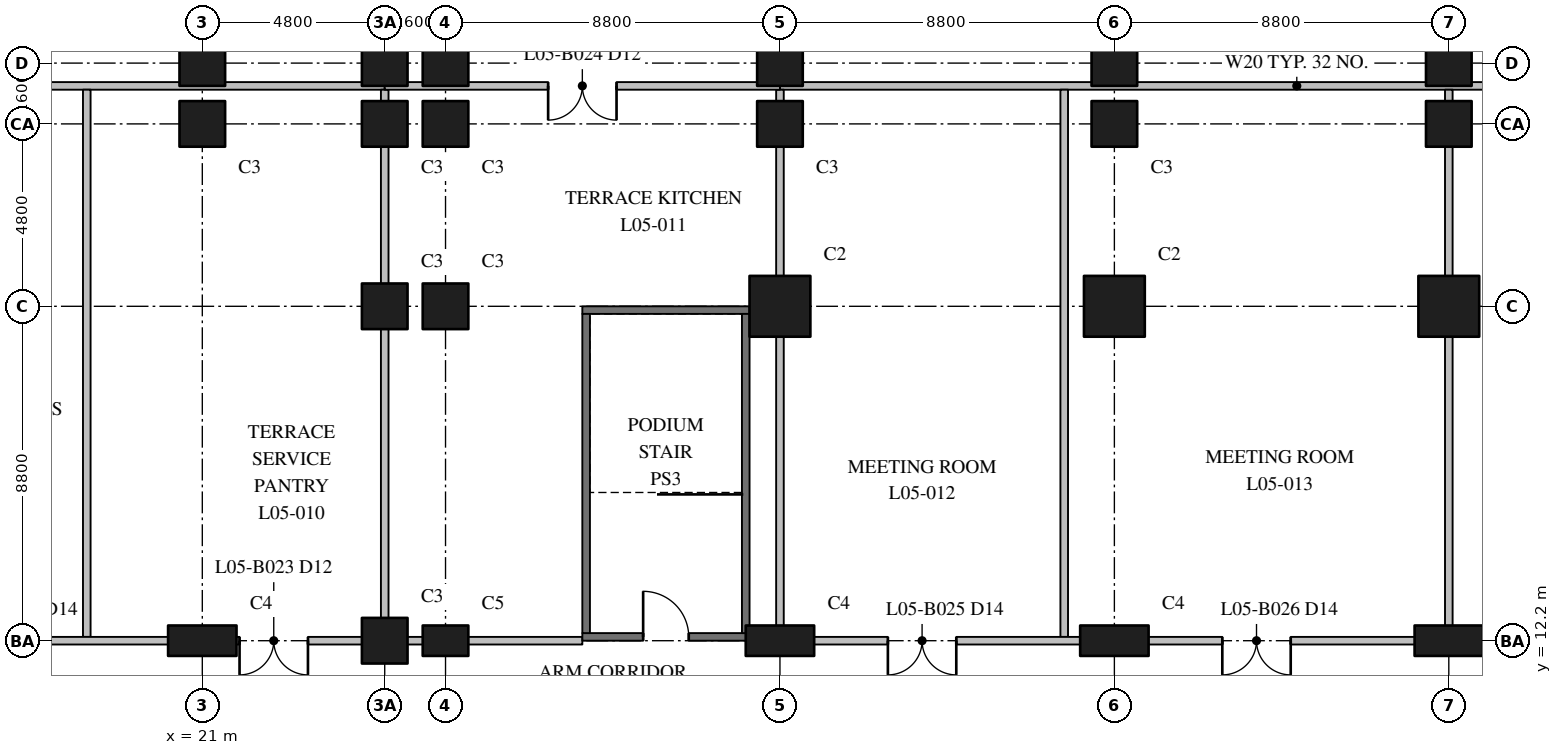
"""IFC4 building model, lengths in metres.
Left out: names, types, materials, properties, quantities, classifications, styles, units other than length and angle.
Written with IfcOpenShell. Run it as: python <this file> out.ifc"""

import sys

from ifc_helpers import new_model, si_unit, direction, frame, frame_2d, origin, origin_2d, place, context, subcontext, project, spatial, rectangle, extrude, element, fill, save


model = new_model("IFC4")
c1 = context("Model", 3, precision=1e-05, world=origin(), true_north=direction((0.0, 1.0)))
c2 = subcontext(c1, "Body", "Model", "MODEL_VIEW")
j1 = project(units=[si_unit("LENGTHUNIT", "METRE"), si_unit("PLANEANGLEUNIT", "RADIAN")], contexts=[c1])
p1 = place(None, origin())
s1 = spatial("IfcSite", under=j1, at=p1, CompositionType="ELEMENT")
p2 = place(p1, origin())
s2 = spatial("IfcBuilding", under=s1, at=p2, CompositionType="ELEMENT")
p3 = place(p2, frame((0.0, 0.0, 29.0)))
s3 = spatial("IfcBuildingStorey", under=s2, at=p3, CompositionType="ELEMENT", Elevation=29.0)
p4 = place(p3, frame((21.0, 12.2, 0.0), z_axis=(0.0, 0.0, 1.0), x_axis=(1.0, 0.0, 0.0)))
e1 = element("IfcColumn", 1, at=p4, inside=s3, PredefinedType="COLUMN", context=c2, shape_type="SweptSolid", body=[
    extrude(rectangle(XDim=1.8, YDim=0.8, at=origin_2d()), origin(), (0.0, 0.0, 1.0), 5.0),
])
for number, where, z_axis, x_axis in (
    (2, (21.0, 25.8, 0.0), (0.0, 0.0, 1.0), (1.0, 0.0, 0.0)),
    (3, (21.0, 27.4, 0.0), (0.0, 0.0, 1.0), (1.0, 0.0, 0.0)),
    (4, (25.8, 12.2, 0.0), (0.0, 0.0, 1.0), (1.0, 0.0, 0.0)),
    (5, (25.8, 21.0, 0.0), (0.0, 0.0, 1.0), (1.0, 0.0, 0.0)),
    (6, (25.8, 25.8, 0.0), (0.0, 0.0, 1.0), (1.0, 0.0, 0.0)),
    (7, (25.8, 27.4, 0.0), (0.0, 0.0, 1.0), (1.0, 0.0, 0.0)),
):
    element("IfcColumn", number, at=place(p3, frame(where, z_axis=z_axis, x_axis=x_axis)), inside=s3, PredefinedType="COLUMN", context=c2, shape_type="SweptSolid", body=[
        extrude(rectangle(XDim=1.2, YDim=1.2, at=origin_2d()), origin(), (0.0, 0.0, 1.0), 5.0),
    ])
p5 = place(p3, frame((27.4, 12.2, 0.0), z_axis=(0.0, 0.0, 1.0), x_axis=(1.0, 0.0, 0.0)))
e8 = element("IfcColumn", 8, at=p5, inside=s3, PredefinedType="COLUMN", context=c2, shape_type="SweptSolid", body=[
    extrude(rectangle(XDim=1.2, YDim=0.8, at=origin_2d()), origin(), (0.0, 0.0, 1.0), 5.0),
])
for number, where, z_axis, x_axis in (
    (9, (27.4, 21.0, 0.0), (0.0, 0.0, 1.0), (1.0, 0.0, 0.0)),
    (10, (27.4, 25.8, 0.0), (0.0, 0.0, 1.0), (1.0, 0.0, 0.0)),
):
    element("IfcColumn", number, at=place(p3, frame(where, z_axis=z_axis, x_axis=x_axis)), inside=s3, PredefinedType="COLUMN", context=c2, shape_type="SweptSolid", body=[
        extrude(rectangle(XDim=1.2, YDim=1.2, at=origin_2d()), origin(), (0.0, 0.0, 1.0), 5.0),
    ])
p6 = place(p3, frame((36.2, 12.2, 0.0), z_axis=(0.0, 0.0, 1.0), x_axis=(1.0, 0.0, 0.0)))
e11 = element("IfcColumn", 11, at=p6, inside=s3, PredefinedType="COLUMN", context=c2, shape_type="SweptSolid", body=[
    extrude(rectangle(XDim=1.8, YDim=0.8, at=origin_2d()), origin(), (0.0, 0.0, 1.0), 5.0),
])
p7 = place(p3, frame((36.2, 21.0, 0.0), z_axis=(0.0, 0.0, 1.0), x_axis=(1.0, 0.0, 0.0)))
e12 = element("IfcColumn", 12, at=p7, inside=s3, PredefinedType="COLUMN", context=c2, shape_type="SweptSolid", body=[
    extrude(rectangle(XDim=1.6, YDim=1.6, at=origin_2d()), origin(), (0.0, 0.0, 1.0), 5.0),
])
p8 = place(p3, frame((36.2, 25.8, 0.0), z_axis=(0.0, 0.0, 1.0), x_axis=(1.0, 0.0, 0.0)))
e13 = element("IfcColumn", 13, at=p8, inside=s3, PredefinedType="COLUMN", context=c2, shape_type="SweptSolid", body=[
    extrude(rectangle(XDim=1.2, YDim=1.2, at=origin_2d()), origin(), (0.0, 0.0, 1.0), 5.0),
])
p9 = place(p3, frame((45.0, 12.2, 0.0), z_axis=(0.0, 0.0, 1.0), x_axis=(1.0, 0.0, 0.0)))
e14 = element("IfcColumn", 14, at=p9, inside=s3, PredefinedType="COLUMN", context=c2, shape_type="SweptSolid", body=[
    extrude(rectangle(XDim=1.8, YDim=0.8, at=origin_2d()), origin(), (0.0, 0.0, 1.0), 5.0),
])
p10 = place(p3, frame((45.0, 21.0, 0.0), z_axis=(0.0, 0.0, 1.0), x_axis=(1.0, 0.0, 0.0)))
e15 = element("IfcColumn", 15, at=p10, inside=s3, PredefinedType="COLUMN", context=c2, shape_type="SweptSolid", body=[
    extrude(rectangle(XDim=1.6, YDim=1.6, at=origin_2d()), origin(), (0.0, 0.0, 1.0), 5.0),
])
p11 = place(p3, frame((45.0, 25.8, 0.0), z_axis=(0.0, 0.0, 1.0), x_axis=(1.0, 0.0, 0.0)))
e16 = element("IfcColumn", 16, at=p11, inside=s3, PredefinedType="COLUMN", context=c2, shape_type="SweptSolid", body=[
    extrude(rectangle(XDim=1.2, YDim=1.2, at=origin_2d()), origin(), (0.0, 0.0, 1.0), 5.0),
])
p12 = place(p3, frame((53.8, 12.2, 0.0), z_axis=(0.0, 0.0, 1.0), x_axis=(1.0, 0.0, 0.0)))
e17 = element("IfcColumn", 17, at=p12, inside=s3, PredefinedType="COLUMN", context=c2, shape_type="SweptSolid", body=[
    extrude(rectangle(XDim=1.8, YDim=0.8, at=origin_2d()), origin(), (0.0, 0.0, 1.0), 5.0),
])
p13 = place(p3, frame((53.8, 21.0, 0.0), z_axis=(0.0, 0.0, 1.0), x_axis=(1.0, 0.0, 0.0)))
e18 = element("IfcColumn", 18, at=p13, inside=s3, PredefinedType="COLUMN", context=c2, shape_type="SweptSolid", body=[
    extrude(rectangle(XDim=1.6, YDim=1.6, at=origin_2d()), origin(), (0.0, 0.0, 1.0), 5.0),
])
for number, where, z_axis, x_axis in (
    (19, (53.8, 25.8, 0.0), (0.0, 0.0, 1.0), (1.0, 0.0, 0.0)),
    (20, (27.4, 27.4, 0.0), (0.0, 0.0, 1.0), (1.0, 0.0, 0.0)),
    (21, (36.2, 27.4, 0.0), (0.0, 0.0, 1.0), (1.0, 0.0, 0.0)),
    (22, (45.0, 27.4, 0.0), (0.0, 0.0, 1.0), (1.0, 0.0, 0.0)),
    (23, (53.8, 27.4, 0.0), (0.0, 0.0, 1.0), (1.0, 0.0, 0.0)),
):
    element("IfcColumn", number, at=place(p3, frame(where, z_axis=z_axis, x_axis=x_axis)), inside=s3, PredefinedType="COLUMN", context=c2, shape_type="SweptSolid", body=[
        extrude(rectangle(XDim=1.2, YDim=1.2, at=origin_2d()), origin(), (0.0, 0.0, 1.0), 5.0),
    ])
p14 = place(p3, frame((31.0, 12.3, 0.0), z_axis=(0.0, 0.0, 1.0), x_axis=(1.0, 0.0, 0.0)))
e24 = element("IfcWall", 24, at=p14, inside=s3, PredefinedType="SHEAR", context=c2, shape_type="SweptSolid", body=[
    extrude(rectangle(XDim=4.4, YDim=0.2, at=frame_2d((2.2, 0.0))), origin(), (0.0, 0.0, 1.0), 4.6),
])
p15 = place(p14, frame((1.6, 0.0, 0.0)))
e25 = element("IfcOpeningElement", 25, at=p15, cuts=e24, PredefinedType="OPENING", context=c2, shape_type="SweptSolid", body=[
    extrude(rectangle(XDim=1.2, YDim=2.1, at=frame_2d((0.6, 1.05))), frame((0.0, 0.11, 0.0), z_axis=(0.0, -1.0, 0.0), x_axis=(1.0, 0.0, 0.0)), (0.0, 0.0, 1.0), 0.22),
])
p16 = place(p3, frame((31.0, 20.9, 0.0), z_axis=(0.0, 0.0, 1.0), x_axis=(1.0, 0.0, 0.0)))
e26 = element("IfcWall", 26, at=p16, inside=s3, PredefinedType="SHEAR", context=c2, shape_type="SweptSolid", body=[
    extrude(rectangle(XDim=4.4, YDim=0.2, at=frame_2d((2.2, 0.0))), origin(), (0.0, 0.0, 1.0), 4.6),
])
for number, where, z_axis, x_axis in (
    (27, (31.1, 12.4, 0.0), (0.0, 0.0, 1.0), (0.0, 1.0, 0.0)),
    (28, (35.3, 12.4, 0.0), (0.0, 0.0, 1.0), (0.0, 1.0, 0.0)),
):
    element("IfcWall", number, at=place(p3, frame(where, z_axis=z_axis, x_axis=x_axis)), inside=s3, PredefinedType="SHEAR", context=c2, shape_type="SweptSolid", body=[
        extrude(rectangle(XDim=8.4, YDim=0.2, at=frame_2d((4.2, 0.0))), origin(), (0.0, 0.0, 1.0), 4.6),
    ])
p17 = place(p3, frame((12.1, 12.2, 0.0), z_axis=(0.0, 0.0, 1.0), x_axis=(1.0, 0.0, 0.0)))
e29 = element("IfcWall", 29, at=p17, inside=s3, PredefinedType="PARTITIONING", context=c2, shape_type="SweptSolid", body=[
    extrude(rectangle(XDim=18.9, YDim=0.2, at=frame_2d((9.45, 0.0))), origin(), (0.0, 0.0, 1.0), 4.55),
])
p18 = place(p17, frame((2.08, 0.0, 0.0)))
e30 = element("IfcOpeningElement", 30, at=p18, cuts=e29, PredefinedType="OPENING", context=c2, shape_type="SweptSolid", body=[
    extrude(rectangle(XDim=1.8, YDim=2.4, at=frame_2d((0.9, 1.2))), frame((0.0, 0.11, 0.0), z_axis=(0.0, -1.0, 0.0), x_axis=(1.0, 0.0, 0.0)), (0.0, 0.0, 1.0), 0.22),
])
p19 = place(p17, frame((9.88, 0.0, 0.0)))
e31 = element("IfcOpeningElement", 31, at=p19, cuts=e29, PredefinedType="OPENING", context=c2, shape_type="SweptSolid", body=[
    extrude(rectangle(XDim=1.8, YDim=2.1, at=frame_2d((0.9, 1.05))), frame((0.0, 0.11, 0.0), z_axis=(0.0, -1.0, 0.0), x_axis=(1.0, 0.0, 0.0)), (0.0, 0.0, 1.0), 0.22),
])
p20 = place(p3, frame((35.4, 12.2, 0.0), z_axis=(0.0, 0.0, 1.0), x_axis=(1.0, 0.0, 0.0)))
e32 = element("IfcWall", 32, at=p20, inside=s3, PredefinedType="PARTITIONING", context=c2, shape_type="SweptSolid", body=[
    extrude(rectangle(XDim=22.4, YDim=0.2, at=frame_2d((11.2, 0.0))), origin(), (0.0, 0.0, 1.0), 4.55),
])
p21 = place(p20, frame((3.64, 0.0, 0.0)))
e33 = element("IfcOpeningElement", 33, at=p21, cuts=e32, PredefinedType="OPENING", context=c2, shape_type="SweptSolid", body=[
    extrude(rectangle(XDim=1.8, YDim=2.4, at=frame_2d((0.9, 1.2))), frame((0.0, 0.11, 0.0), z_axis=(0.0, -1.0, 0.0), x_axis=(1.0, 0.0, 0.0)), (0.0, 0.0, 1.0), 0.22),
])
p22 = place(p20, frame((12.44, 0.0, 0.0)))
e34 = element("IfcOpeningElement", 34, at=p22, cuts=e32, PredefinedType="OPENING", context=c2, shape_type="SweptSolid", body=[
    extrude(rectangle(XDim=1.8, YDim=2.4, at=frame_2d((0.9, 1.2))), frame((0.0, 0.11, 0.0), z_axis=(0.0, -1.0, 0.0), x_axis=(1.0, 0.0, 0.0)), (0.0, 0.0, 1.0), 0.22),
])
p23 = place(p3, frame((12.1, 26.8, 0.0), z_axis=(0.0, 0.0, 1.0), x_axis=(1.0, 0.0, 0.0)))
e35 = element("IfcWall", 35, at=p23, inside=s3, PredefinedType="PARTITIONING", context=c2, shape_type="SweptSolid", body=[
    extrude(rectangle(XDim=13.7, YDim=0.2, at=frame_2d((6.85, 0.0))), origin(), (0.0, 0.0, 1.0), 4.55),
])
p24 = place(p3, frame((25.8, 26.8, 0.0), z_axis=(0.0, 0.0, 1.0), x_axis=(1.0, 0.0, 0.0)))
e36 = element("IfcWall", 36, at=p24, inside=s3, PredefinedType="PARTITIONING", context=c2, shape_type="SweptSolid", body=[
    extrude(rectangle(XDim=10.4, YDim=0.2, at=frame_2d((5.2, 0.0))), origin(), (0.0, 0.0, 1.0), 4.55),
])
p25 = place(p24, frame((4.3, 0.0, 0.0)))
e37 = element("IfcOpeningElement", 37, at=p25, cuts=e36, PredefinedType="OPENING", context=c2, shape_type="SweptSolid", body=[
    extrude(rectangle(XDim=1.8, YDim=2.1, at=frame_2d((0.9, 1.05))), frame((0.0, 0.11, 0.0), z_axis=(0.0, -1.0, 0.0), x_axis=(1.0, 0.0, 0.0)), (0.0, 0.0, 1.0), 0.22),
])
p26 = place(p3, frame((36.2, 26.8, 0.0), z_axis=(0.0, 0.0, 1.0), x_axis=(1.0, 0.0, 0.0)))
e38 = element("IfcWall", 38, at=p26, inside=s3, PredefinedType="PARTITIONING", context=c2, shape_type="SweptSolid", body=[
    extrude(rectangle(XDim=27.2, YDim=0.2, at=frame_2d((13.6, 0.0))), origin(), (0.0, 0.0, 1.0), 4.55),
])
p27 = place(p26, frame((21.1, 0.0, 0.0)))
e39 = element("IfcOpeningElement", 39, at=p27, cuts=e38, PredefinedType="OPENING", context=c2, shape_type="SweptSolid", body=[
    extrude(rectangle(XDim=1.8, YDim=2.4, at=frame_2d((0.9, 1.2))), frame((0.0, 0.11, 0.0), z_axis=(0.0, -1.0, 0.0), x_axis=(1.0, 0.0, 0.0)), (0.0, 0.0, 1.0), 0.22),
])
for number, where, z_axis, x_axis in (
    (40, (36.2, 12.3, 0.0), (0.0, 0.0, 1.0), (0.0, 1.0, 0.0)),
    (41, (17.96, 12.3, 0.0), (0.0, 0.0, 1.0), (0.0, 1.0, 0.0)),
    (42, (25.8, 12.3, 0.0), (0.0, 0.0, 1.0), (0.0, 1.0, 0.0)),
    (43, (43.68, 12.3, 0.0), (0.0, 0.0, 1.0), (0.0, 1.0, 0.0)),
    (44, (53.8, 12.3, 0.0), (0.0, 0.0, 1.0), (0.0, 1.0, 0.0)),
):
    element("IfcWall", number, at=place(p3, frame(where, z_axis=z_axis, x_axis=x_axis)), inside=s3, PredefinedType="PARTITIONING", context=c2, shape_type="SweptSolid", body=[
        extrude(rectangle(XDim=14.4, YDim=0.2, at=frame_2d((7.2, 0.0))), origin(), (0.0, 0.0, 1.0), 4.55),
    ])
p28 = place(p15, origin())
e45 = element("IfcDoor", 45, at=p28, inside=s3, OperationType="SINGLE_SWING_LEFT", PredefinedType="DOOR", context=c2, shape_type="SweptSolid", body=[
    extrude(rectangle(XDim=1.2, YDim=2.1, at=frame_2d((0.6, 1.05))), frame((0.0, 0.025, 0.0), z_axis=(0.0, -1.0, 0.0), x_axis=(1.0, 0.0, 0.0)), (0.0, 0.0, 1.0), 0.05),
])
fill(e25, e45)
p29 = place(p19, frame((1.8, 0.0, 0.0), z_axis=(0.0, 0.0, 1.0), x_axis=(-1.0, 0.0, 0.0)))
e46 = element("IfcDoor", 46, at=p29, inside=s3, OperationType="DOUBLE_DOOR_SINGLE_SWING", PredefinedType="DOOR", context=c2, shape_type="SweptSolid", body=[
    extrude(rectangle(XDim=1.8, YDim=2.1, at=frame_2d((0.9, 1.05))), frame((0.0, 0.025, 0.0), z_axis=(0.0, -1.0, 0.0), x_axis=(1.0, 0.0, 0.0)), (0.0, 0.0, 1.0), 0.05),
])
fill(e31, e46)
p30 = place(p25, frame((1.8, 0.0, 0.0), z_axis=(0.0, 0.0, 1.0), x_axis=(-1.0, 0.0, 0.0)))
e47 = element("IfcDoor", 47, at=p30, inside=s3, OperationType="DOUBLE_DOOR_SINGLE_SWING", PredefinedType="DOOR", context=c2, shape_type="SweptSolid", body=[
    extrude(rectangle(XDim=1.8, YDim=2.1, at=frame_2d((0.9, 1.05))), frame((0.0, 0.025, 0.0), z_axis=(0.0, -1.0, 0.0), x_axis=(1.0, 0.0, 0.0)), (0.0, 0.0, 1.0), 0.05),
])
fill(e37, e47)
p31 = place(p21, frame((1.8, 0.0, 0.0), z_axis=(0.0, 0.0, 1.0), x_axis=(-1.0, 0.0, 0.0)))
e48 = element("IfcDoor", 48, at=p31, inside=s3, OperationType="DOUBLE_DOOR_SINGLE_SWING", PredefinedType="DOOR", context=c2, shape_type="SweptSolid", body=[
    extrude(rectangle(XDim=1.8, YDim=2.4, at=frame_2d((0.9, 1.2))), frame((0.0, 0.025, 0.0), z_axis=(0.0, -1.0, 0.0), x_axis=(1.0, 0.0, 0.0)), (0.0, 0.0, 1.0), 0.05),
])
fill(e33, e48)
p32 = place(p22, frame((1.8, 0.0, 0.0), z_axis=(0.0, 0.0, 1.0), x_axis=(-1.0, 0.0, 0.0)))
e49 = element("IfcDoor", 49, at=p32, inside=s3, OperationType="DOUBLE_DOOR_SINGLE_SWING", PredefinedType="DOOR", context=c2, shape_type="SweptSolid", body=[
    extrude(rectangle(XDim=1.8, YDim=2.4, at=frame_2d((0.9, 1.2))), frame((0.0, 0.025, 0.0), z_axis=(0.0, -1.0, 0.0), x_axis=(1.0, 0.0, 0.0)), (0.0, 0.0, 1.0), 0.05),
])
fill(e34, e49)
save(model, sys.argv[1])
